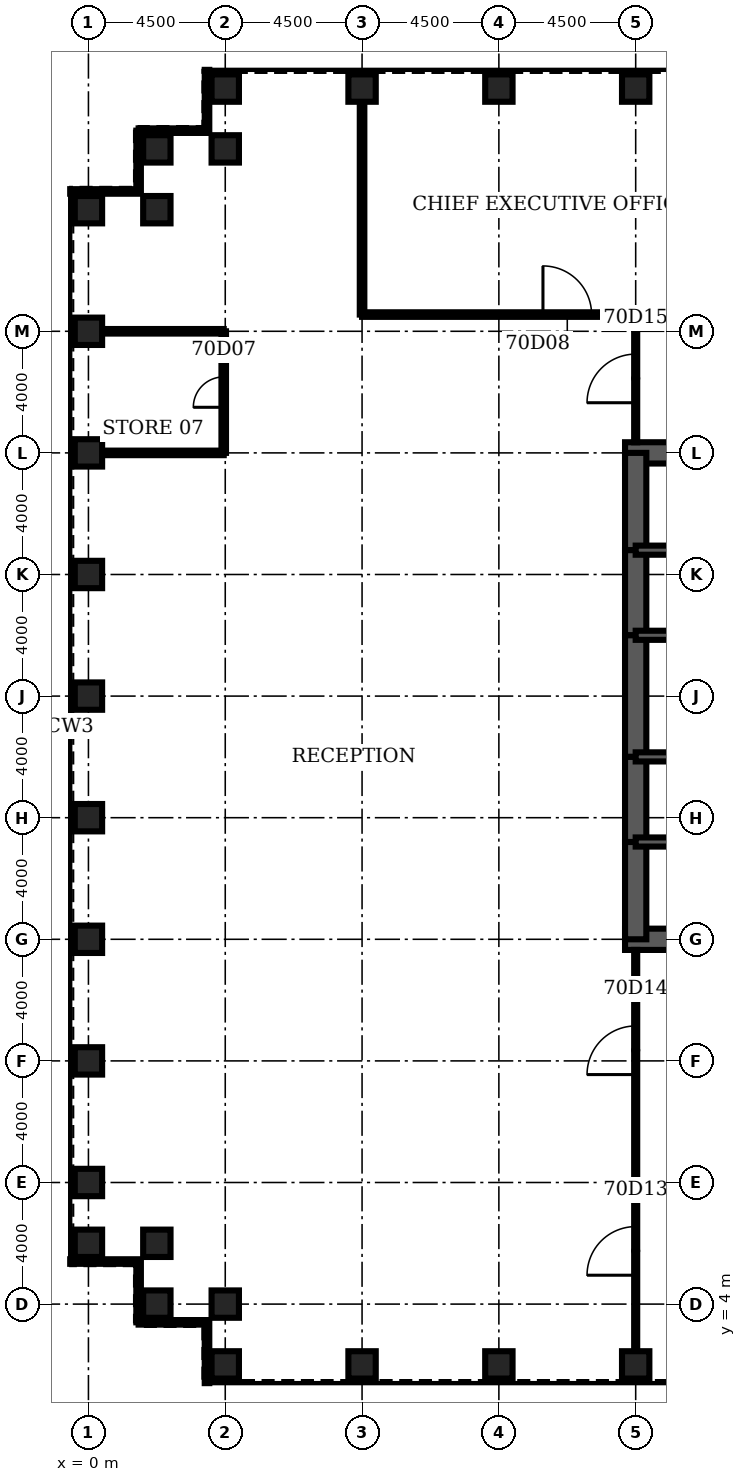
"""IFC4 building model, lengths in metres.
Left out: names, types, materials, properties, quantities, classifications, styles, units other than length and angle.
Written with IfcOpenShell. Run it as: python <this file> out.ifc"""

import sys

from ifc_helpers import new_model, si_unit, direction, frame, frame_2d, origin, origin_2d, place, context, subcontext, project, spatial, rectangle, hollow_rectangle, extrude, element, fill, save


model = new_model("IFC4")
c1 = context("Model", 3, precision=1e-05, world=origin(), true_north=direction((0.0, 1.0)))
c2 = subcontext(c1, "Body", "Model", "MODEL_VIEW")
j1 = project(units=[si_unit("LENGTHUNIT", "METRE"), si_unit("PLANEANGLEUNIT", "RADIAN")], contexts=[c1])
p1 = place(None, origin())
s1 = spatial("IfcSite", under=j1, at=p1, CompositionType="ELEMENT")
p2 = place(p1, origin())
s2 = spatial("IfcBuilding", under=s1, at=p2, CompositionType="ELEMENT")
p3 = place(p2, frame((0.0, 0.0, 308.9)))
s3 = spatial("IfcBuildingStorey", under=s2, at=p3, CompositionType="ELEMENT", Elevation=308.9)
for number, where, z_axis, x_axis in (
    (1, (4.5, 2.0, 0.0), (0.0, 0.0, 1.0), (0.0, 1.0, 0.0)),
    (2, (9.0, 2.0, 0.0), (0.0, 0.0, 1.0), (0.0, 1.0, 0.0)),
    (3, (13.5, 2.0, 0.0), (0.0, 0.0, 1.0), (0.0, 1.0, 0.0)),
    (4, (18.0, 2.0, 0.0), (0.0, 0.0, 1.0), (0.0, 1.0, 0.0)),
    (5, (18.0, 44.0, 0.0), (0.0, 0.0, 1.0), (0.0, 1.0, 0.0)),
    (6, (13.5, 44.0, 0.0), (0.0, 0.0, 1.0), (0.0, 1.0, 0.0)),
    (7, (9.0, 44.0, 0.0), (0.0, 0.0, 1.0), (0.0, 1.0, 0.0)),
    (8, (4.5, 44.0, 0.0), (0.0, 0.0, 1.0), (0.0, 1.0, 0.0)),
    (9, (4.5, 42.0, 0.0), (0.0, 0.0, 1.0), (0.0, 1.0, 0.0)),
    (10, (2.25, 42.0, 0.0), (0.0, 0.0, 1.0), (1.0, 0.0, 0.0)),
    (11, (2.25, 40.0, 0.0), (0.0, 0.0, 1.0), (1.0, 0.0, 0.0)),
    (12, (0.0, 40.0, 0.0), (0.0, 0.0, 1.0), (1.0, 0.0, 0.0)),
    (13, (0.0, 36.0, 0.0), (0.0, 0.0, 1.0), (1.0, 0.0, 0.0)),
    (14, (0.0, 32.0, 0.0), (0.0, 0.0, 1.0), (1.0, 0.0, 0.0)),
    (15, (0.0, 28.0, 0.0), (0.0, 0.0, 1.0), (1.0, 0.0, 0.0)),
    (16, (0.0, 24.0, 0.0), (0.0, 0.0, 1.0), (1.0, 0.0, 0.0)),
    (17, (0.0, 20.0, 0.0), (0.0, 0.0, 1.0), (1.0, 0.0, 0.0)),
    (18, (0.0, 16.0, 0.0), (0.0, 0.0, 1.0), (1.0, 0.0, 0.0)),
    (19, (0.0, 12.0, 0.0), (0.0, 0.0, 1.0), (1.0, 0.0, 0.0)),
    (20, (0.0, 8.0, 0.0), (0.0, 0.0, 1.0), (1.0, 0.0, 0.0)),
    (21, (0.0, 6.0, 0.0), (0.0, 0.0, 1.0), (1.0, 0.0, 0.0)),
    (22, (2.25, 6.0, 0.0), (0.0, 0.0, 1.0), (1.0, 0.0, 0.0)),
    (23, (2.25, 4.0, 0.0), (0.0, 0.0, 1.0), (1.0, 0.0, 0.0)),
    (24, (4.5, 4.0, 0.0), (0.0, 0.0, 1.0), (0.0, 1.0, 0.0)),
):
    element("IfcColumn", number, at=place(p3, frame(where, z_axis=z_axis, x_axis=x_axis)), inside=s3, PredefinedType="COLUMN", context=c2, shape_type="SweptSolid", body=[
        extrude(hollow_rectangle(XDim=0.9, YDim=0.9, WallThickness=0.06, at=origin_2d()), origin(), (0.0, 0.0, 1.0), 4.2),
    ])
for number, where, z_axis, x_axis in (
    (25, (17.65, 16.0, 0.0), (0.0, 0.0, 1.0), (1.0, 0.0, 0.0)),
    (26, (27.0, 32.0, 0.0), (0.0, 0.0, 1.0), (-1.0, 0.0, 0.0)),
):
    element("IfcWall", number, at=place(p3, frame(where, z_axis=z_axis, x_axis=x_axis)), inside=s3, PredefinedType="SHEAR", context=c2, shape_type="SweptSolid", body=[
        extrude(rectangle(XDim=9.35, YDim=0.7, at=frame_2d((4.675, 0.0))), origin(), (0.0, 0.0, 1.0), 4.2),
    ])
p4 = place(p3, frame((18.0, 32.0, 0.0), z_axis=(0.0, 0.0, 1.0), x_axis=(0.0, -1.0, 0.0)))
e27 = element("IfcWall", 27, at=p4, inside=s3, PredefinedType="SHEAR", context=c2, shape_type="SweptSolid", body=[
    extrude(rectangle(XDim=3.2, YDim=0.7, at=frame_2d((1.6, 0.0))), origin(), (0.0, 0.0, 1.0), 4.2),
])
p5 = place(p3, frame((18.0, 28.8, 0.0), z_axis=(0.0, 0.0, 1.0), x_axis=(0.0, -1.0, 0.0)))
e28 = element("IfcWall", 28, at=p5, inside=s3, PredefinedType="SHEAR", context=c2, shape_type="SweptSolid", body=[
    extrude(rectangle(XDim=2.8, YDim=0.7, at=frame_2d((1.4, 0.0))), origin(), (0.0, 0.0, 1.0), 4.2),
])
p6 = place(p5, frame((0.4, 0.0, 0.0)))
e29 = element("IfcOpeningElement", 29, at=p6, cuts=e28, PredefinedType="OPENING", context=c2, shape_type="SweptSolid", body=[
    extrude(rectangle(XDim=1.8, YDim=2.1, at=frame_2d((0.9, 1.05))), frame((0.0, 0.36, 0.0), z_axis=(0.0, -1.0, 0.0), x_axis=(1.0, 0.0, 0.0)), (0.0, 0.0, 1.0), 0.72),
])
p7 = place(p3, frame((18.0, 26.0, 0.0), z_axis=(0.0, 0.0, 1.0), x_axis=(0.0, -1.0, 0.0)))
e30 = element("IfcWall", 30, at=p7, inside=s3, PredefinedType="SHEAR", context=c2, shape_type="SweptSolid", body=[
    extrude(rectangle(XDim=4.0, YDim=0.7, at=frame_2d((2.0, 0.0))), origin(), (0.0, 0.0, 1.0), 4.2),
])
p8 = place(p3, frame((18.0, 22.0, 0.0), z_axis=(0.0, 0.0, 1.0), x_axis=(0.0, -1.0, 0.0)))
e31 = element("IfcWall", 31, at=p8, inside=s3, PredefinedType="SHEAR", context=c2, shape_type="SweptSolid", body=[
    extrude(rectangle(XDim=2.8, YDim=0.7, at=frame_2d((1.4, 0.0))), origin(), (0.0, 0.0, 1.0), 4.2),
])
p9 = place(p8, frame((0.6, 0.0, 0.0)))
e32 = element("IfcOpeningElement", 32, at=p9, cuts=e31, PredefinedType="OPENING", context=c2, shape_type="SweptSolid", body=[
    extrude(rectangle(XDim=1.8, YDim=2.1, at=frame_2d((0.9, 1.05))), frame((0.0, 0.36, 0.0), z_axis=(0.0, -1.0, 0.0), x_axis=(1.0, 0.0, 0.0)), (0.0, 0.0, 1.0), 0.72),
])
p10 = place(p3, frame((18.0, 19.2, 0.0), z_axis=(0.0, 0.0, 1.0), x_axis=(0.0, -1.0, 0.0)))
e33 = element("IfcWall", 33, at=p10, inside=s3, PredefinedType="SHEAR", context=c2, shape_type="SweptSolid", body=[
    extrude(rectangle(XDim=3.2, YDim=0.7, at=frame_2d((1.6, 0.0))), origin(), (0.0, 0.0, 1.0), 4.2),
])
p11 = place(p3, frame((18.0, 19.2, 0.0), z_axis=(0.0, 0.0, 1.0), x_axis=(1.0, 0.0, 0.0)))
e34 = element("IfcWall", 34, at=p11, inside=s3, PredefinedType="SOLIDWALL", context=c2, shape_type="SweptSolid", body=[
    extrude(rectangle(XDim=9.0, YDim=0.3, at=frame_2d((4.5, 0.0))), origin(), (0.0, 0.0, 1.0), 4.2),
])
p12 = place(p11, frame((0.65, 0.0, 0.0)))
e35 = element("IfcOpeningElement", 35, at=p12, cuts=e34, PredefinedType="OPENING", context=c2, shape_type="SweptSolid", body=[
    extrude(rectangle(XDim=1.0, YDim=2.1, at=frame_2d((0.5, 1.05))), frame((0.0, 0.16, 0.0), z_axis=(0.0, -1.0, 0.0), x_axis=(1.0, 0.0, 0.0)), (0.0, 0.0, 1.0), 0.32),
])
p13 = place(p3, frame((18.0, 28.8, 0.0), z_axis=(0.0, 0.0, 1.0), x_axis=(1.0, 0.0, 0.0)))
e36 = element("IfcWall", 36, at=p13, inside=s3, PredefinedType="SOLIDWALL", context=c2, shape_type="SweptSolid", body=[
    extrude(rectangle(XDim=9.0, YDim=0.3, at=frame_2d((4.5, 0.0))), origin(), (0.0, 0.0, 1.0), 4.2),
])
p14 = place(p13, frame((0.65, 0.0, 0.0)))
e37 = element("IfcOpeningElement", 37, at=p14, cuts=e36, PredefinedType="OPENING", context=c2, shape_type="SweptSolid", body=[
    extrude(rectangle(XDim=1.0, YDim=2.1, at=frame_2d((0.5, 1.05))), frame((0.0, 0.16, 0.0), z_axis=(0.0, -1.0, 0.0), x_axis=(1.0, 0.0, 0.0)), (0.0, 0.0, 1.0), 0.32),
])
p15 = place(p3, frame((18.0, 22.0, 0.0), z_axis=(0.0, 0.0, 1.0), x_axis=(1.0, 0.0, 0.0)))
e38 = element("IfcWall", 38, at=p15, inside=s3, PredefinedType="SOLIDWALL", context=c2, shape_type="SweptSolid", body=[
    extrude(rectangle(XDim=6.0, YDim=0.3, at=frame_2d((3.0, 0.0))), origin(), (0.0, 0.0, 1.0), 4.2),
])
p16 = place(p15, frame((4.4, 0.0, 0.0)))
e39 = element("IfcOpeningElement", 39, at=p16, cuts=e38, PredefinedType="OPENING", context=c2, shape_type="SweptSolid", body=[
    extrude(rectangle(XDim=1.0, YDim=2.1, at=frame_2d((0.5, 1.05))), frame((0.0, 0.16, 0.0), z_axis=(0.0, -1.0, 0.0), x_axis=(1.0, 0.0, 0.0)), (0.0, 0.0, 1.0), 0.32),
])
p17 = place(p15, frame((0.6, 0.0, 0.0)))
e40 = element("IfcOpeningElement", 40, at=p17, cuts=e38, PredefinedType="OPENING", context=c2, shape_type="SweptSolid", body=[
    extrude(rectangle(XDim=1.0, YDim=2.1, at=frame_2d((0.5, 1.05))), frame((0.0, 0.16, 0.0), z_axis=(0.0, -1.0, 0.0), x_axis=(1.0, 0.0, 0.0)), (0.0, 0.0, 1.0), 0.32),
])
p18 = place(p3, frame((18.0, 26.0, 0.0), z_axis=(0.0, 0.0, 1.0), x_axis=(1.0, 0.0, 0.0)))
e41 = element("IfcWall", 41, at=p18, inside=s3, PredefinedType="SOLIDWALL", context=c2, shape_type="SweptSolid", body=[
    extrude(rectangle(XDim=6.0, YDim=0.3, at=frame_2d((3.0, 0.0))), origin(), (0.0, 0.0, 1.0), 4.2),
])
for number, where, z_axis, x_axis in (
    (42, (0.45, 32.0, 0.0), (0.0, 0.0, 1.0), (1.0, 0.0, 0.0)),
    (43, (0.45, 36.0, 0.0), (0.0, 0.0, 1.0), (1.0, 0.0, 0.0)),
):
    element("IfcWall", number, at=place(p3, frame(where, z_axis=z_axis, x_axis=x_axis)), inside=s3, PredefinedType="PARTITIONING", context=c2, shape_type="SweptSolid", body=[
        extrude(rectangle(XDim=4.0, YDim=0.15, at=frame_2d((2.0, 0.0))), origin(), (0.0, 0.0, 1.0), 3.0),
    ])
p19 = place(p3, frame((9.0, 36.55, 0.0), z_axis=(0.0, 0.0, 1.0), x_axis=(1.0, 0.0, 0.0)))
e44 = element("IfcWall", 44, at=p19, inside=s3, PredefinedType="PARTITIONING", context=c2, shape_type="SweptSolid", body=[
    extrude(rectangle(XDim=13.5, YDim=0.15, at=frame_2d((6.75, 0.0))), origin(), (0.0, 0.0, 1.0), 3.0),
])
p20 = place(p19, frame((5.95, 0.0, 0.0)))
e45 = element("IfcOpeningElement", 45, at=p20, cuts=e44, PredefinedType="OPENING", context=c2, shape_type="SweptSolid", body=[
    extrude(rectangle(XDim=1.6, YDim=2.1, at=frame_2d((0.8, 1.05))), frame((0.0, 0.085, 0.0), z_axis=(0.0, -1.0, 0.0), x_axis=(1.0, 0.0, 0.0)), (0.0, 0.0, 1.0), 0.17),
])
p21 = place(p3, frame((4.45, 32.0, 0.0), z_axis=(0.0, 0.0, 1.0), x_axis=(0.0, 1.0, 0.0)))
e46 = element("IfcWall", 46, at=p21, inside=s3, PredefinedType="PARTITIONING", context=c2, shape_type="SweptSolid", body=[
    extrude(rectangle(XDim=4.0, YDim=0.15, at=frame_2d((2.0, 0.0))), origin(), (0.0, 0.0, 1.0), 3.0),
])
p22 = place(p21, frame((1.5, 0.0, 0.0)))
e47 = element("IfcOpeningElement", 47, at=p22, cuts=e46, PredefinedType="OPENING", context=c2, shape_type="SweptSolid", body=[
    extrude(rectangle(XDim=1.0, YDim=2.1, at=frame_2d((0.5, 1.05))), frame((0.0, 0.085, 0.0), z_axis=(0.0, -1.0, 0.0), x_axis=(1.0, 0.0, 0.0)), (0.0, 0.0, 1.0), 0.17),
])
p23 = place(p3, frame((9.0, 36.55, 0.0), z_axis=(0.0, 0.0, 1.0), x_axis=(0.0, 1.0, 0.0)))
e48 = element("IfcWall", 48, at=p23, inside=s3, PredefinedType="PARTITIONING", context=c2, shape_type="SweptSolid", body=[
    extrude(rectangle(XDim=7.0, YDim=0.15, at=frame_2d((3.5, 0.0))), origin(), (0.0, 0.0, 1.0), 3.0),
])
p24 = place(p3, frame((18.0, 2.45, 0.0), z_axis=(0.0, 0.0, 1.0), x_axis=(0.0, 1.0, 0.0)))
e49 = element("IfcWall", 49, at=p24, inside=s3, PredefinedType="PARTITIONING", context=c2, shape_type="SweptSolid", body=[
    extrude(rectangle(XDim=13.2, YDim=0.1, at=frame_2d((6.6, 0.0))), origin(), (0.0, 0.0, 1.0), 3.0),
])
p25 = place(p24, frame((2.5, 0.0, 0.0)))
e50 = element("IfcOpeningElement", 50, at=p25, cuts=e49, PredefinedType="OPENING", context=c2, shape_type="SweptSolid", body=[
    extrude(rectangle(XDim=1.6, YDim=2.1, at=frame_2d((0.8, 1.05))), frame((0.0, 0.06, 0.0), z_axis=(0.0, -1.0, 0.0), x_axis=(1.0, 0.0, 0.0)), (0.0, 0.0, 1.0), 0.12),
])
p26 = place(p24, frame((9.1, 0.0, 0.0)))
e51 = element("IfcOpeningElement", 51, at=p26, cuts=e49, PredefinedType="OPENING", context=c2, shape_type="SweptSolid", body=[
    extrude(rectangle(XDim=1.6, YDim=2.1, at=frame_2d((0.8, 1.05))), frame((0.0, 0.06, 0.0), z_axis=(0.0, -1.0, 0.0), x_axis=(1.0, 0.0, 0.0)), (0.0, 0.0, 1.0), 0.12),
])
p27 = place(p3, frame((18.0, 32.35, 0.0), z_axis=(0.0, 0.0, 1.0), x_axis=(0.0, 1.0, 0.0)))
e52 = element("IfcWall", 52, at=p27, inside=s3, PredefinedType="PARTITIONING", context=c2, shape_type="SweptSolid", body=[
    extrude(rectangle(XDim=4.2, YDim=0.1, at=frame_2d((2.1, 0.0))), origin(), (0.0, 0.0, 1.0), 3.0),
])
p28 = place(p27, frame((1.3, 0.0, 0.0)))
e53 = element("IfcOpeningElement", 53, at=p28, cuts=e52, PredefinedType="OPENING", context=c2, shape_type="SweptSolid", body=[
    extrude(rectangle(XDim=1.6, YDim=2.1, at=frame_2d((0.8, 1.05))), frame((0.0, 0.06, 0.0), z_axis=(0.0, -1.0, 0.0), x_axis=(1.0, 0.0, 0.0)), (0.0, 0.0, 1.0), 0.12),
])
p29 = place(p3, frame((3.9, 44.6, 0.0), z_axis=(0.0, 0.0, 1.0), x_axis=(0.0, -1.0, 0.0)))
e54 = element("IfcWall", 54, at=p29, inside=s3, PredefinedType="ELEMENTEDWALL", context=c2, shape_type="SweptSolid", body=[
    extrude(rectangle(XDim=2.0, YDim=0.15, at=frame_2d((1.0, 0.0))), origin(), (0.0, 0.0, 1.0), 4.04),
])
p30 = place(p3, frame((3.9, 42.6, 0.0), z_axis=(0.0, 0.0, 1.0), x_axis=(-1.0, 0.0, 0.0)))
e55 = element("IfcWall", 55, at=p30, inside=s3, PredefinedType="ELEMENTEDWALL", context=c2, shape_type="SweptSolid", body=[
    extrude(rectangle(XDim=2.25, YDim=0.15, at=frame_2d((1.125, 0.0))), origin(), (0.0, 0.0, 1.0), 4.04),
])
p31 = place(p3, frame((1.65, 42.6, 0.0), z_axis=(0.0, 0.0, 1.0), x_axis=(0.0, -1.0, 0.0)))
e56 = element("IfcWall", 56, at=p31, inside=s3, PredefinedType="ELEMENTEDWALL", context=c2, shape_type="SweptSolid", body=[
    extrude(rectangle(XDim=2.0, YDim=0.15, at=frame_2d((1.0, 0.0))), origin(), (0.0, 0.0, 1.0), 4.04),
])
for number, where, z_axis, x_axis in (
    (57, (1.65, 40.6, 0.0), (0.0, 0.0, 1.0), (-1.0, 0.0, 0.0)),
    (58, (-0.6, 5.4, 0.0), (0.0, 0.0, 1.0), (1.0, 0.0, 0.0)),
):
    element("IfcWall", number, at=place(p3, frame(where, z_axis=z_axis, x_axis=x_axis)), inside=s3, PredefinedType="ELEMENTEDWALL", context=c2, shape_type="SweptSolid", body=[
        extrude(rectangle(XDim=2.25, YDim=0.15, at=frame_2d((1.125, 0.0))), origin(), (0.0, 0.0, 1.0), 4.04),
    ])
p32 = place(p3, frame((1.65, 5.4, 0.0), z_axis=(0.0, 0.0, 1.0), x_axis=(0.0, -1.0, 0.0)))
e59 = element("IfcWall", 59, at=p32, inside=s3, PredefinedType="ELEMENTEDWALL", context=c2, shape_type="SweptSolid", body=[
    extrude(rectangle(XDim=2.0, YDim=0.15, at=frame_2d((1.0, 0.0))), origin(), (0.0, 0.0, 1.0), 4.04),
])
p33 = place(p3, frame((1.65, 3.4, 0.0), z_axis=(0.0, 0.0, 1.0), x_axis=(1.0, 0.0, 0.0)))
e60 = element("IfcWall", 60, at=p33, inside=s3, PredefinedType="ELEMENTEDWALL", context=c2, shape_type="SweptSolid", body=[
    extrude(rectangle(XDim=2.25, YDim=0.15, at=frame_2d((1.125, 0.0))), origin(), (0.0, 0.0, 1.0), 4.04),
])
p34 = place(p3, frame((3.9, 3.4, 0.0), z_axis=(0.0, 0.0, 1.0), x_axis=(0.0, -1.0, 0.0)))
e61 = element("IfcWall", 61, at=p34, inside=s3, PredefinedType="ELEMENTEDWALL", context=c2, shape_type="SweptSolid", body=[
    extrude(rectangle(XDim=2.0, YDim=0.15, at=frame_2d((1.0, 0.0))), origin(), (0.0, 0.0, 1.0), 4.04),
])
p35 = place(p22, origin())
e62 = element("IfcDoor", 62, at=p35, inside=s3, OperationType="SINGLE_SWING_LEFT", PredefinedType="DOOR", context=c2, shape_type="SweptSolid", body=[
    extrude(rectangle(XDim=1.0, YDim=2.1, at=frame_2d((0.5, 1.05))), frame((0.0, 0.025, 0.0), z_axis=(0.0, -1.0, 0.0), x_axis=(1.0, 0.0, 0.0)), (0.0, 0.0, 1.0), 0.05),
])
fill(e47, e62)
p36 = place(p20, origin())
e63 = element("IfcDoor", 63, at=p36, inside=s3, OperationType="SINGLE_SWING_LEFT", PredefinedType="DOOR", context=c2, shape_type="SweptSolid", body=[
    extrude(rectangle(XDim=1.6, YDim=2.1, at=frame_2d((0.8, 1.05))), frame((0.0, 0.025, 0.0), z_axis=(0.0, -1.0, 0.0), x_axis=(1.0, 0.0, 0.0)), (0.0, 0.0, 1.0), 0.05),
])
fill(e45, e63)
p37 = place(p25, origin())
e64 = element("IfcDoor", 64, at=p37, inside=s3, OperationType="SINGLE_SWING_LEFT", PredefinedType="DOOR", context=c2, shape_type="SweptSolid", body=[
    extrude(rectangle(XDim=1.6, YDim=2.1, at=frame_2d((0.8, 1.05))), frame((0.0, 0.025, 0.0), z_axis=(0.0, -1.0, 0.0), x_axis=(1.0, 0.0, 0.0)), (0.0, 0.0, 1.0), 0.05),
])
fill(e50, e64)
p38 = place(p26, origin())
e65 = element("IfcDoor", 65, at=p38, inside=s3, OperationType="SINGLE_SWING_LEFT", PredefinedType="DOOR", context=c2, shape_type="SweptSolid", body=[
    extrude(rectangle(XDim=1.6, YDim=2.1, at=frame_2d((0.8, 1.05))), frame((0.0, 0.025, 0.0), z_axis=(0.0, -1.0, 0.0), x_axis=(1.0, 0.0, 0.0)), (0.0, 0.0, 1.0), 0.05),
])
fill(e51, e65)
p39 = place(p28, origin())
e66 = element("IfcDoor", 66, at=p39, inside=s3, OperationType="SINGLE_SWING_LEFT", PredefinedType="DOOR", context=c2, shape_type="SweptSolid", body=[
    extrude(rectangle(XDim=1.6, YDim=2.1, at=frame_2d((0.8, 1.05))), frame((0.0, 0.025, 0.0), z_axis=(0.0, -1.0, 0.0), x_axis=(1.0, 0.0, 0.0)), (0.0, 0.0, 1.0), 0.05),
])
fill(e53, e66)
p40 = place(p12, origin())
e67 = element("IfcDoor", 67, at=p40, inside=s3, OperationType="SINGLE_SWING_LEFT", PredefinedType="DOOR", context=c2, shape_type="SweptSolid", body=[
    extrude(rectangle(XDim=1.0, YDim=2.1, at=frame_2d((0.5, 1.05))), frame((0.0, 0.025, 0.0), z_axis=(0.0, -1.0, 0.0), x_axis=(1.0, 0.0, 0.0)), (0.0, 0.0, 1.0), 0.05),
])
fill(e35, e67)
p41 = place(p14, origin())
e68 = element("IfcDoor", 68, at=p41, inside=s3, OperationType="SINGLE_SWING_LEFT", PredefinedType="DOOR", context=c2, shape_type="SweptSolid", body=[
    extrude(rectangle(XDim=1.0, YDim=2.1, at=frame_2d((0.5, 1.05))), frame((0.0, 0.025, 0.0), z_axis=(0.0, -1.0, 0.0), x_axis=(1.0, 0.0, 0.0)), (0.0, 0.0, 1.0), 0.05),
])
fill(e37, e68)
p42 = place(p9, origin())
e69 = element("IfcDoor", 69, at=p42, inside=s3, OperationType="SINGLE_SWING_LEFT", PredefinedType="DOOR", context=c2, shape_type="SweptSolid", body=[
    extrude(rectangle(XDim=1.8, YDim=2.1, at=frame_2d((0.9, 1.05))), frame((0.0, 0.35, 0.0), z_axis=(0.0, -1.0, 0.0), x_axis=(1.0, 0.0, 0.0)), (0.0, 0.0, 1.0), 0.699),
])
fill(e32, e69)
p43 = place(p6, origin())
e70 = element("IfcDoor", 70, at=p43, inside=s3, OperationType="SINGLE_SWING_LEFT", PredefinedType="DOOR", context=c2, shape_type="SweptSolid", body=[
    extrude(rectangle(XDim=1.8, YDim=2.1, at=frame_2d((0.9, 1.05))), frame((0.0, 0.35, 0.0), z_axis=(0.0, -1.0, 0.0), x_axis=(1.0, 0.0, 0.0)), (0.0, 0.0, 1.0), 0.699),
])
fill(e29, e70)
p44 = place(p17, origin())
e71 = element("IfcDoor", 71, at=p44, inside=s3, OperationType="SINGLE_SWING_LEFT", PredefinedType="DOOR", context=c2, shape_type="SweptSolid", body=[
    extrude(rectangle(XDim=1.0, YDim=2.1, at=frame_2d((0.5, 1.05))), frame((0.0, 0.025, 0.0), z_axis=(0.0, -1.0, 0.0), x_axis=(1.0, 0.0, 0.0)), (0.0, 0.0, 1.0), 0.05),
])
fill(e40, e71)
save(model, sys.argv[1])
